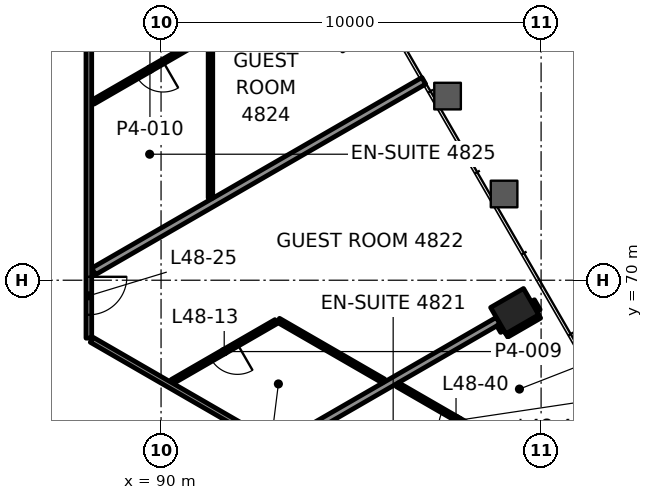
"""IFC4 building model, lengths in metres.
Left out: names, types, materials, properties, quantities, classifications, styles, units other than length and angle.
Written with IfcOpenShell. Run it as: python <this file> out.ifc"""

import sys

from ifc_helpers import new_model, si_unit, direction, frame, frame_2d, origin, origin_2d, place, context, subcontext, project, spatial, rectangle, hollow_rectangle, extrude, element, fill, save


model = new_model("IFC4")
c1 = context("Model", 3, precision=1e-05, world=origin(), true_north=direction((0.0, 1.0)))
c2 = subcontext(c1, "Body", "Model", "MODEL_VIEW")
j1 = project(units=[si_unit("LENGTHUNIT", "METRE"), si_unit("PLANEANGLEUNIT", "RADIAN")], contexts=[c1])
p1 = place(None, origin())
s1 = spatial("IfcSite", under=j1, at=p1, CompositionType="ELEMENT")
p2 = place(p1, origin())
s2 = spatial("IfcBuilding", under=s1, at=p2, CompositionType="ELEMENT")
p3 = place(p2, frame((0.0, 0.0, 206.5)))
s3 = spatial("IfcBuildingStorey", under=s2, at=p3, CompositionType="ELEMENT", Elevation=206.5)
p4 = place(p3, frame((99.305, 69.186, -0.0), z_axis=(0.0, 0.0, 1.0), x_axis=(-0.5, 0.866025403784, 0.0)))
e1 = element("IfcColumn", 1, at=p4, inside=s3, PredefinedType="COLUMN", context=c2, shape_type="SweptSolid", body=[
    extrude(hollow_rectangle(XDim=0.8, YDim=1.0, WallThickness=0.05, at=origin_2d()), origin(), (0.0, 0.0, 1.0), 3.9),
])
p5 = place(p3, frame((99.073, 68.59, 0.0), z_axis=(0.0, 0.0, 1.0), x_axis=(0.866039090965, 0.499976292358, 0.0)))
e2 = element("IfcWall", 2, at=p5, inside=s3, PredefinedType="PARTITIONING", context=c2, shape_type="SweptSolid", body=[
    extrude(rectangle(XDim=0.999, YDim=0.2, at=frame_2d((0.5, 0.0))), origin(), (0.0, 0.0, 1.0), 3.1),
])
p6 = place(p3, frame((93.215, 65.669, 0.0), z_axis=(0.0, 0.0, 1.0), x_axis=(0.866021893259, 0.50000608036, 0.0)))
e3 = element("IfcWall", 3, at=p6, inside=s3, PredefinedType="PARTITIONING", context=c2, shape_type="SweptSolid", body=[
    extrude(rectangle(XDim=6.532, YDim=0.2, at=frame_2d((3.266, 0.0))), origin(), (0.0, 0.0, 1.0), 3.1),
])
p7 = place(p3, frame((93.027, 68.911, 0.0), z_axis=(0.0, 0.0, 1.0), x_axis=(-0.866028267601, -0.499995039691, 0.0)))
e4 = element("IfcWall", 4, at=p7, inside=s3, PredefinedType="PARTITIONING", context=c2, shape_type="SweptSolid", body=[
    extrude(rectangle(XDim=3.153, YDim=0.12, at=frame_2d((1.576, 0.0))), origin(), (0.0, 0.0, 1.0), 3.1),
])
p8 = place(p7, frame((1.176, 0.0, 0.0)))
e5 = element("IfcOpeningElement", 5, at=p8, cuts=e4, PredefinedType="OPENING", context=c2, shape_type="SweptSolid", body=[
    extrude(rectangle(XDim=0.8, YDim=2.1, at=frame_2d((0.4, 1.05))), frame((0.0, 0.07, 0.0), z_axis=(0.0, -1.0, 0.0), x_axis=(1.0, 0.0, 0.0)), (0.0, 0.0, 1.0), 0.14),
])
p9 = place(p3, frame((88.227, 70.233, 0.0), z_axis=(0.0, 0.0, 1.0), x_axis=(0.866032780528, 0.499987222889, 0.0)))
e6 = element("IfcWall", 6, at=p9, inside=s3, PredefinedType="PARTITIONING", context=c2, shape_type="SweptSolid", body=[
    extrude(rectangle(XDim=10.031, YDim=0.2, at=frame_2d((5.015, 0.0))), origin(), (0.0, 0.0, 1.0), 3.022),
])
p10 = place(p3, frame((91.205, 76.418, 0.0), z_axis=(0.0, 0.0, 1.0), x_axis=(-0.865997524453, -0.50004828531, 0.0)))
e7 = element("IfcWall", 7, at=p10, inside=s3, PredefinedType="PARTITIONING", context=c2, shape_type="SweptSolid", body=[
    extrude(rectangle(XDim=3.459, YDim=0.12, at=frame_2d((1.729, 0.0))), origin(), (0.0, 0.0, 1.0), 3.1),
])
p11 = place(p10, frame((1.33, 0.0, 0.0)))
e8 = element("IfcOpeningElement", 8, at=p11, cuts=e7, PredefinedType="OPENING", context=c2, shape_type="SweptSolid", body=[
    extrude(rectangle(XDim=0.8, YDim=2.1, at=frame_2d((0.4, 1.05))), frame((0.0, 0.07, 0.0), z_axis=(0.0, -1.0, 0.0), x_axis=(1.0, 0.0, 0.0)), (0.0, 0.0, 1.0), 0.14),
])
p12 = place(p3, frame((91.3, 72.162, 0.0), z_axis=(0.0, 0.0, 1.0), x_axis=(0.0, 1.0, 0.0)))
e9 = element("IfcWall", 9, at=p12, inside=s3, PredefinedType="PARTITIONING", context=c2, shape_type="SweptSolid", body=[
    extrude(rectangle(XDim=4.31, YDim=0.12, at=frame_2d((2.155, 0.0))), origin(), (0.0, 0.0, 1.0), 3.1),
])
p13 = place(p3, frame((88.1, 85.1, 0.0), z_axis=(0.0, 0.0, 1.0), x_axis=(0.0, -1.0, 0.0)))
e10 = element("IfcWall", 10, at=p13, inside=s3, PredefinedType="PARTITIONING", context=c2, shape_type="SweptSolid", body=[
    extrude(rectangle(XDim=16.624, YDim=0.15, at=frame_2d((8.312, 0.0))), origin(), (0.0, 0.0, 1.0), 3.1),
])
p14 = place(p13, frame((2.707, 0.0, 0.0)))
e11 = element("IfcOpeningElement", 11, at=p14, cuts=e10, PredefinedType="OPENING", context=c2, shape_type="SweptSolid", body=[
    extrude(rectangle(XDim=0.9, YDim=2.1, at=frame_2d((0.45, 1.05))), frame((0.0, 0.085, 0.0), z_axis=(0.0, -1.0, 0.0), x_axis=(1.0, 0.0, 0.0)), (0.0, 0.0, 1.0), 0.17),
])
p15 = place(p13, frame((5.684, 0.0, 0.0)))
e12 = element("IfcOpeningElement", 12, at=p15, cuts=e10, PredefinedType="OPENING", context=c2, shape_type="SweptSolid", body=[
    extrude(rectangle(XDim=1.0, YDim=2.1, at=frame_2d((0.5, 1.05))), frame((0.0, 0.085, 0.0), z_axis=(0.0, -1.0, 0.0), x_axis=(1.0, 0.0, 0.0)), (0.0, 0.0, 1.0), 0.17),
])
p16 = place(p13, frame((15.01, 0.0, 0.0)))
e13 = element("IfcOpeningElement", 13, at=p16, cuts=e10, PredefinedType="OPENING", context=c2, shape_type="SweptSolid", body=[
    extrude(rectangle(XDim=1.0, YDim=2.1, at=frame_2d((0.5, 1.05))), frame((0.0, 0.085, 0.0), z_axis=(0.0, -1.0, 0.0), x_axis=(1.0, 0.0, 0.0)), (0.0, 0.0, 1.0), 0.17),
])
p17 = place(p3, frame((99.888, 69.177, 0.0), z_axis=(0.0, 0.0, 1.0), x_axis=(-0.500005339912, 0.866022320763, 0.0)))
e14 = element("IfcWall", 14, at=p17, inside=s3, PredefinedType="PARTITIONING", context=c2, shape_type="SweptSolid", body=[
    extrude(rectangle(XDim=0.299, YDim=0.2, at=frame_2d((0.149, 0.0))), origin(), (0.0, 0.0, 1.0), 3.1),
])
p18 = place(p3, frame((99.022, 68.677, 0.0), z_axis=(0.0, 0.0, 1.0), x_axis=(-0.4999705729, 0.866042392862, 0.0)))
e15 = element("IfcWall", 15, at=p18, inside=s3, PredefinedType="PARTITIONING", context=c2, shape_type="SweptSolid", body=[
    extrude(rectangle(XDim=0.199, YDim=0.2, at=frame_2d((0.099, 0.0))), origin(), (0.0, 0.0, 1.0), 3.1),
])
p19 = place(p3, frame((99.456, 65.384, 0.0), z_axis=(0.0, 0.0, 1.0), x_axis=(-0.866053838069, 0.49995074714, 0.0)))
e16 = element("IfcWall", 16, at=p19, inside=s3, PredefinedType="PARTITIONING", context=c2, shape_type="SweptSolid", body=[
    extrude(rectangle(XDim=3.734, YDim=0.12, at=frame_2d((1.867, 0.0))), origin(), (0.0, 0.0, 1.0), 3.1),
])
p20 = place(p19, frame((1.556, 0.0, 0.0)))
e17 = element("IfcOpeningElement", 17, at=p20, cuts=e16, PredefinedType="OPENING", context=c2, shape_type="SweptSolid", body=[
    extrude(rectangle(XDim=0.8, YDim=2.1, at=frame_2d((0.4, 1.05))), frame((0.0, 0.07, 0.0), z_axis=(0.0, -1.0, 0.0), x_axis=(1.0, 0.0, 0.0)), (0.0, 0.0, 1.0), 0.14),
])
p21 = place(p3, frame((95.853, 67.349, 0.0), z_axis=(0.0, 0.0, 1.0), x_axis=(-0.866032814021, 0.499987164874, 0.0)))
e18 = element("IfcWall", 18, at=p21, inside=s3, PredefinedType="PARTITIONING", context=c2, shape_type="SweptSolid", body=[
    extrude(rectangle(XDim=3.193, YDim=0.12, at=frame_2d((1.597, 0.0))), origin(), (0.0, 0.0, 1.0), 3.1),
])
p22 = place(p3, frame((88.175, 68.433, 0.0), z_axis=(0.0, 0.0, 1.0), x_axis=(0.866030582951, -0.499991029314, 0.0)))
e19 = element("IfcWall", 19, at=p22, inside=s3, PredefinedType="PARTITIONING", context=c2, shape_type="SweptSolid", body=[
    extrude(rectangle(XDim=13.954, YDim=0.15, at=frame_2d((6.977, 0.0))), origin(), (0.0, 0.0, 1.0), 3.1),
])
p23 = place(p22, frame((10.967, 0.0, 0.0)))
e20 = element("IfcOpeningElement", 20, at=p23, cuts=e19, PredefinedType="OPENING", context=c2, shape_type="SweptSolid", body=[
    extrude(rectangle(XDim=1.0, YDim=2.1, at=frame_2d((0.5, 1.05))), frame((0.0, 0.085, 0.0), z_axis=(0.0, -1.0, 0.0), x_axis=(1.0, 0.0, 0.0)), (0.0, 0.0, 1.0), 0.17),
])
p24 = place(p8, origin())
e21 = element("IfcDoor", 21, at=p24, inside=s3, OperationType="SINGLE_SWING_LEFT", PredefinedType="DOOR", context=c2, shape_type="SweptSolid", body=[
    extrude(rectangle(XDim=0.8, YDim=2.1, at=frame_2d((0.4, 1.05))), frame((0.0, 0.025, 0.0), z_axis=(0.0, -1.0, 0.0), x_axis=(1.0, 0.0, 0.0)), (0.0, 0.0, 1.0), 0.05),
])
fill(e5, e21)
p25 = place(p11, origin())
e22 = element("IfcDoor", 22, at=p25, inside=s3, OperationType="SINGLE_SWING_LEFT", PredefinedType="DOOR", context=c2, shape_type="SweptSolid", body=[
    extrude(rectangle(XDim=0.8, YDim=2.1, at=frame_2d((0.4, 1.05))), frame((0.0, 0.025, 0.0), z_axis=(0.0, -1.0, 0.0), x_axis=(1.0, 0.0, 0.0)), (0.0, 0.0, 1.0), 0.05),
])
fill(e8, e22)
p26 = place(p16, origin())
e23 = element("IfcDoor", 23, at=p26, inside=s3, OperationType="SINGLE_SWING_RIGHT", PredefinedType="DOOR", context=c2, shape_type="SweptSolid", body=[
    extrude(rectangle(XDim=1.0, YDim=2.1, at=frame_2d((0.5, 1.05))), frame((0.0, 0.025, 0.0), z_axis=(0.0, -1.0, 0.0), x_axis=(1.0, 0.0, 0.0)), (0.0, 0.0, 1.0), 0.05),
])
fill(e13, e23)
p27 = place(p20, origin())
e24 = element("IfcDoor", 24, at=p27, inside=s3, OperationType="SINGLE_SWING_RIGHT", PredefinedType="DOOR", context=c2, shape_type="SweptSolid", body=[
    extrude(rectangle(XDim=0.8, YDim=2.1, at=frame_2d((0.4, 1.05))), frame((0.0, 0.025, 0.0), z_axis=(0.0, -1.0, 0.0), x_axis=(1.0, 0.0, 0.0)), (0.0, 0.0, 1.0), 0.05),
])
fill(e17, e24)
save(model, sys.argv[1])
